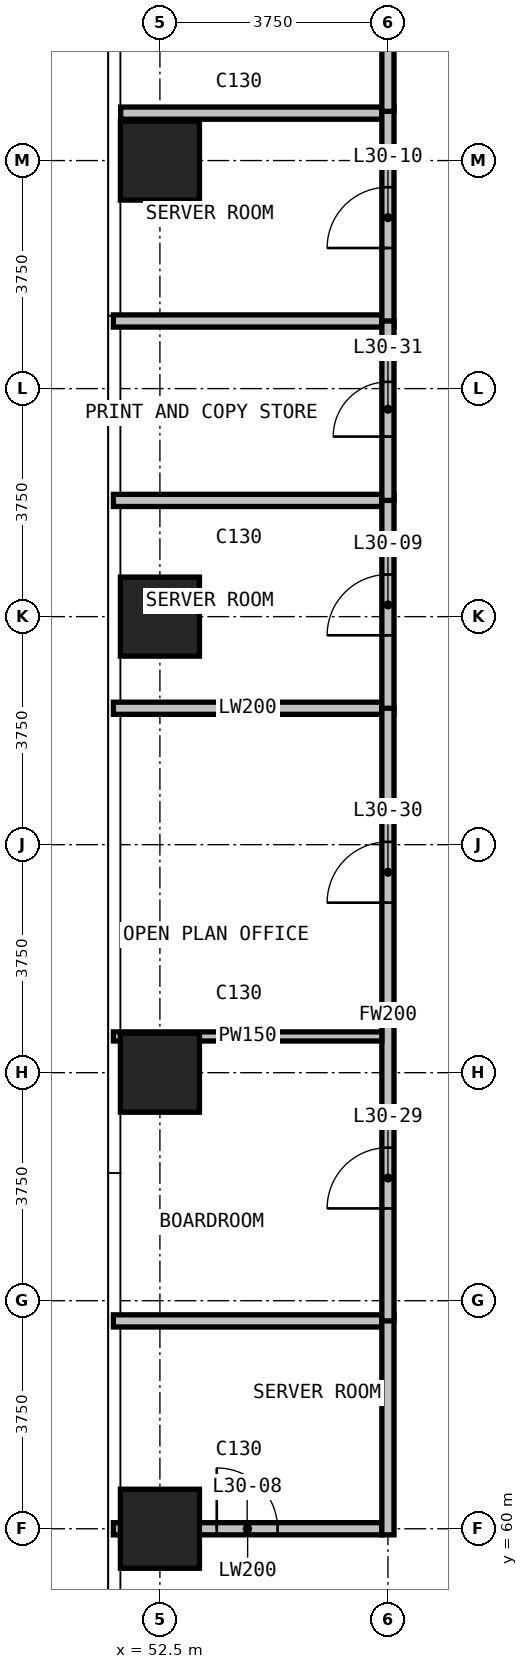
"""IFC4 building model, lengths in metres.
Left out: names, types, materials, properties, quantities, classifications, styles, units other than length and angle.
Written with IfcOpenShell. Run it as: python <this file> out.ifc"""

import sys

from ifc_helpers import new_model, si_unit, direction, frame, frame_2d, origin, origin_2d, place, context, subcontext, project, spatial, rectangle, extrude, element, fill, save


model = new_model("IFC4")
c1 = context("Model", 3, precision=1e-05, world=origin(), true_north=direction((0.0, 1.0)))
c2 = subcontext(c1, "Body", "Model", "MODEL_VIEW")
j1 = project(units=[si_unit("LENGTHUNIT", "METRE"), si_unit("PLANEANGLEUNIT", "RADIAN")], contexts=[c1])
p1 = place(None, origin())
s1 = spatial("IfcSite", under=j1, at=p1, CompositionType="ELEMENT")
p2 = place(p1, origin())
s2 = spatial("IfcBuilding", under=s1, at=p2, CompositionType="ELEMENT")
p3 = place(p2, frame((0.0, 0.0, 121.6)))
s3 = spatial("IfcBuildingStorey", under=s2, at=p3, CompositionType="ELEMENT", Elevation=121.6)
for number, where, z_axis, x_axis in (
    (1, (52.5, 60.0, 0.0), (0.0, 0.0, 1.0), (1.0, 0.0, 0.0)),
    (2, (52.5, 67.5, 0.0), (0.0, 0.0, 1.0), (1.0, 0.0, 0.0)),
    (3, (52.5, 75.0, 0.0), (0.0, 0.0, 1.0), (1.0, 0.0, 0.0)),
    (4, (52.5, 82.5, 0.0), (0.0, 0.0, 1.0), (1.0, 0.0, 0.0)),
):
    element("IfcColumn", number, at=place(p3, frame(where, z_axis=z_axis, x_axis=x_axis)), inside=s3, PredefinedType="COLUMN", context=c2, shape_type="SweptSolid", body=[
        extrude(rectangle(XDim=1.3, YDim=1.3, at=origin_2d()), origin(), (0.0, 0.0, 1.0), 3.6),
    ])
p4 = place(p3, frame((51.735, 60.0, 0.0), z_axis=(0.0, 0.0, 1.0), x_axis=(1.0, 0.0, 0.0)))
e5 = element("IfcWall", 5, at=p4, inside=s3, PredefinedType="PARTITIONING", context=c2, shape_type="SweptSolid", body=[
    extrude(rectangle(XDim=4.415, YDim=0.2, at=frame_2d((2.208, 0.0))), origin(), (0.0, 0.0, 1.0), 3.3),
])
p5 = place(p4, frame((1.7, 0.0, 0.0)))
e6 = element("IfcOpeningElement", 6, at=p5, cuts=e5, PredefinedType="OPENING", context=c2, shape_type="SweptSolid", body=[
    extrude(rectangle(XDim=1.0, YDim=2.2, at=frame_2d((0.5, 1.1))), frame((0.0, 0.11, 0.0), z_axis=(0.0, -1.0, 0.0), x_axis=(1.0, 0.0, 0.0)), (0.0, 0.0, 1.0), 0.22),
])
for number, where, z_axis, x_axis in (
    (7, (51.735, 63.418, 0.0), (0.0, 0.0, 1.0), (1.0, 0.0, 0.0)),
    (8, (51.735, 73.493, 0.0), (0.0, 0.0, 1.0), (1.0, 0.0, 0.0)),
    (9, (51.735, 76.911, 0.0), (0.0, 0.0, 1.0), (1.0, 0.0, 0.0)),
    (10, (51.735, 79.862, 0.0), (0.0, 0.0, 1.0), (1.0, 0.0, 0.0)),
):
    element("IfcWall", number, at=place(p3, frame(where, z_axis=z_axis, x_axis=x_axis)), inside=s3, PredefinedType="PARTITIONING", context=c2, shape_type="SweptSolid", body=[
        extrude(rectangle(XDim=4.415, YDim=0.2, at=frame_2d((2.208, 0.0))), origin(), (0.0, 0.0, 1.0), 3.3),
    ])
p6 = place(p3, frame((51.855, 83.28, 0.0), z_axis=(0.0, 0.0, 1.0), x_axis=(1.0, 0.0, 0.0)))
e11 = element("IfcWall", 11, at=p6, inside=s3, PredefinedType="PARTITIONING", context=c2, shape_type="SweptSolid", body=[
    extrude(rectangle(XDim=4.295, YDim=0.2, at=frame_2d((2.147, 0.0))), origin(), (0.0, 0.0, 1.0), 3.3),
])
p7 = place(p3, frame((56.25, 59.9, 0.0), z_axis=(0.0, 0.0, 1.0), x_axis=(0.0, 1.0, 0.0)))
e12 = element("IfcWall", 12, at=p7, inside=s3, PredefinedType="PARTITIONING", context=c2, shape_type="SweptSolid", body=[
    extrude(rectangle(XDim=3.618, YDim=0.2, at=frame_2d((1.809, 0.0))), origin(), (0.0, 0.0, 1.0), 3.3),
])
p8 = place(p3, frame((56.25, 73.393, 0.0), z_axis=(0.0, 0.0, 1.0), x_axis=(0.0, 1.0, 0.0)))
e13 = element("IfcWall", 13, at=p8, inside=s3, PredefinedType="PARTITIONING", context=c2, shape_type="SweptSolid", body=[
    extrude(rectangle(XDim=3.618, YDim=0.2, at=frame_2d((1.809, 0.0))), origin(), (0.0, 0.0, 1.0), 3.3),
])
p9 = place(p8, frame((1.3, 0.0, 0.0)))
e14 = element("IfcOpeningElement", 14, at=p9, cuts=e13, PredefinedType="OPENING", context=c2, shape_type="SweptSolid", body=[
    extrude(rectangle(XDim=1.0, YDim=2.2, at=frame_2d((0.5, 1.1))), frame((0.0, 0.11, 0.0), z_axis=(0.0, -1.0, 0.0), x_axis=(1.0, 0.0, 0.0)), (0.0, 0.0, 1.0), 0.22),
])
p10 = place(p3, frame((56.25, 79.762, 0.0), z_axis=(0.0, 0.0, 1.0), x_axis=(0.0, 1.0, 0.0)))
e15 = element("IfcWall", 15, at=p10, inside=s3, PredefinedType="PARTITIONING", context=c2, shape_type="SweptSolid", body=[
    extrude(rectangle(XDim=3.618, YDim=0.2, at=frame_2d((1.809, 0.0))), origin(), (0.0, 0.0, 1.0), 3.3),
])
p11 = place(p10, frame((1.3, 0.0, 0.0)))
e16 = element("IfcOpeningElement", 16, at=p11, cuts=e15, PredefinedType="OPENING", context=c2, shape_type="SweptSolid", body=[
    extrude(rectangle(XDim=1.0, YDim=2.2, at=frame_2d((0.5, 1.1))), frame((0.0, 0.11, 0.0), z_axis=(0.0, -1.0, 0.0), x_axis=(1.0, 0.0, 0.0)), (0.0, 0.0, 1.0), 0.22),
])
p12 = place(p3, frame((56.25, 63.418, 0.0), z_axis=(0.0, 0.0, 1.0), x_axis=(0.0, 1.0, 0.0)))
e17 = element("IfcWall", 17, at=p12, inside=s3, PredefinedType="PARTITIONING", context=c2, shape_type="SweptSolid", body=[
    extrude(rectangle(XDim=10.075, YDim=0.2, at=frame_2d((5.038, 0.0))), origin(), (0.0, 0.0, 1.0), 3.3),
])
p13 = place(p12, frame((1.85, 0.0, 0.0)))
e18 = element("IfcOpeningElement", 18, at=p13, cuts=e17, PredefinedType="OPENING", context=c2, shape_type="SweptSolid", body=[
    extrude(rectangle(XDim=1.0, YDim=2.2, at=frame_2d((0.5, 1.1))), frame((0.0, 0.11, 0.0), z_axis=(0.0, -1.0, 0.0), x_axis=(1.0, 0.0, 0.0)), (0.0, 0.0, 1.0), 0.22),
])
p14 = place(p12, frame((6.878, 0.0, 0.0)))
e19 = element("IfcOpeningElement", 19, at=p14, cuts=e17, PredefinedType="OPENING", context=c2, shape_type="SweptSolid", body=[
    extrude(rectangle(XDim=1.0, YDim=2.2, at=frame_2d((0.5, 1.1))), frame((0.0, 0.11, 0.0), z_axis=(0.0, -1.0, 0.0), x_axis=(1.0, 0.0, 0.0)), (0.0, 0.0, 1.0), 0.22),
])
p15 = place(p3, frame((56.25, 76.911, 0.0), z_axis=(0.0, 0.0, 1.0), x_axis=(0.0, 1.0, 0.0)))
e20 = element("IfcWall", 20, at=p15, inside=s3, PredefinedType="PARTITIONING", context=c2, shape_type="SweptSolid", body=[
    extrude(rectangle(XDim=2.951, YDim=0.2, at=frame_2d((1.476, 0.0))), origin(), (0.0, 0.0, 1.0), 3.3),
])
p16 = place(p15, frame((1.05, 0.0, 0.0)))
e21 = element("IfcOpeningElement", 21, at=p16, cuts=e20, PredefinedType="OPENING", context=c2, shape_type="SweptSolid", body=[
    extrude(rectangle(XDim=0.9, YDim=2.2, at=frame_2d((0.45, 1.1))), frame((0.0, 0.11, 0.0), z_axis=(0.0, -1.0, 0.0), x_axis=(1.0, 0.0, 0.0)), (0.0, 0.0, 1.0), 0.22),
])
p17 = place(p3, frame((56.25, 83.31, 0.0), z_axis=(0.0, 0.0, 1.0), x_axis=(0.0, 1.0, 0.0)))
e22 = element("IfcWall", 22, at=p17, inside=s3, PredefinedType="PARTITIONING", context=c2, shape_type="SweptSolid", body=[
    extrude(rectangle(XDim=7.335, YDim=0.2, at=frame_2d((3.667, 0.0))), origin(), (0.0, 0.0, 1.0), 3.3),
])
p18 = place(p3, frame((51.735, 68.096, 0.0), z_axis=(0.0, 0.0, 1.0), x_axis=(1.0, 0.0, 0.0)))
e23 = element("IfcWall", 23, at=p18, inside=s3, PredefinedType="PARTITIONING", context=c2, shape_type="SweptSolid", body=[
    extrude(rectangle(XDim=4.415, YDim=0.15, at=frame_2d((2.208, 0.0))), origin(), (0.0, 0.0, 1.0), 3.3),
])
p19 = place(p5, origin())
e24 = element("IfcDoor", 24, at=p19, inside=s3, OperationType="SINGLE_SWING_LEFT", PredefinedType="DOOR", context=c2, shape_type="SweptSolid", body=[
    extrude(rectangle(XDim=1.0, YDim=2.2, at=frame_2d((0.5, 1.1))), frame((0.0, 0.025, 0.0), z_axis=(0.0, -1.0, 0.0), x_axis=(1.0, 0.0, 0.0)), (0.0, 0.0, 1.0), 0.05),
])
fill(e6, e24)
p20 = place(p9, origin())
e25 = element("IfcDoor", 25, at=p20, inside=s3, OperationType="SINGLE_SWING_LEFT", PredefinedType="DOOR", context=c2, shape_type="SweptSolid", body=[
    extrude(rectangle(XDim=1.0, YDim=2.2, at=frame_2d((0.5, 1.1))), frame((0.0, 0.025, 0.0), z_axis=(0.0, -1.0, 0.0), x_axis=(1.0, 0.0, 0.0)), (0.0, 0.0, 1.0), 0.05),
])
fill(e14, e25)
p21 = place(p11, origin())
e26 = element("IfcDoor", 26, at=p21, inside=s3, OperationType="SINGLE_SWING_LEFT", PredefinedType="DOOR", context=c2, shape_type="SweptSolid", body=[
    extrude(rectangle(XDim=1.0, YDim=2.2, at=frame_2d((0.5, 1.1))), frame((0.0, 0.025, 0.0), z_axis=(0.0, -1.0, 0.0), x_axis=(1.0, 0.0, 0.0)), (0.0, 0.0, 1.0), 0.05),
])
fill(e16, e26)
p22 = place(p13, origin())
e27 = element("IfcDoor", 27, at=p22, inside=s3, OperationType="SINGLE_SWING_LEFT", PredefinedType="DOOR", context=c2, shape_type="SweptSolid", body=[
    extrude(rectangle(XDim=1.0, YDim=2.2, at=frame_2d((0.5, 1.1))), frame((0.0, 0.025, 0.0), z_axis=(0.0, -1.0, 0.0), x_axis=(1.0, 0.0, 0.0)), (0.0, 0.0, 1.0), 0.05),
])
fill(e18, e27)
p23 = place(p14, origin())
e28 = element("IfcDoor", 28, at=p23, inside=s3, OperationType="SINGLE_SWING_LEFT", PredefinedType="DOOR", context=c2, shape_type="SweptSolid", body=[
    extrude(rectangle(XDim=1.0, YDim=2.2, at=frame_2d((0.5, 1.1))), frame((0.0, 0.025, 0.0), z_axis=(0.0, -1.0, 0.0), x_axis=(1.0, 0.0, 0.0)), (0.0, 0.0, 1.0), 0.05),
])
fill(e19, e28)
p24 = place(p16, origin())
e29 = element("IfcDoor", 29, at=p24, inside=s3, OperationType="SINGLE_SWING_RIGHT", PredefinedType="DOOR", context=c2, shape_type="SweptSolid", body=[
    extrude(rectangle(XDim=0.9, YDim=2.2, at=frame_2d((0.45, 1.1))), frame((0.0, 0.025, 0.0), z_axis=(0.0, -1.0, 0.0), x_axis=(1.0, 0.0, 0.0)), (0.0, 0.0, 1.0), 0.05),
])
fill(e21, e29)
save(model, sys.argv[1])
